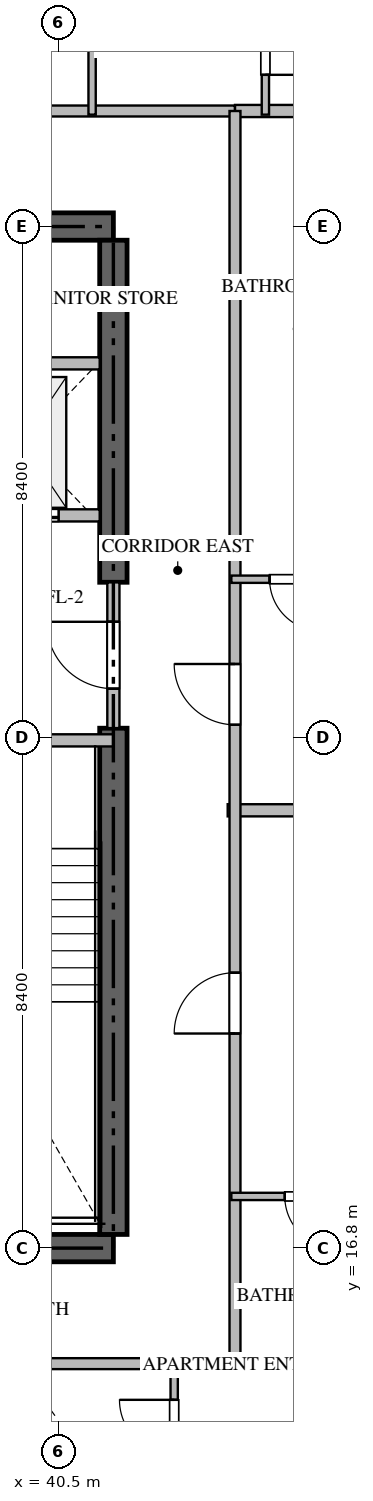
"""IFC4 building model, lengths in metres.
Left out: names, types, materials, properties, quantities, classifications, styles, units other than length and angle.
Written with IfcOpenShell. Run it as: python <this file> out.ifc"""

import sys

from ifc_helpers import new_model, si_unit, direction, frame, frame_2d, origin, place, context, subcontext, project, spatial, rectangle, extrude, source, transform, mapped, element, fill, save


model = new_model("IFC4")
c1 = context("Model", 3, precision=1e-05, world=origin(), true_north=direction((0.0, 1.0)))
c2 = subcontext(c1, "Body", "Model", "MODEL_VIEW")
j1 = project(units=[si_unit("LENGTHUNIT", "METRE"), si_unit("PLANEANGLEUNIT", "RADIAN")], contexts=[c1])
p1 = place(None, origin())
s1 = spatial("IfcSite", under=j1, at=p1, CompositionType="ELEMENT")
p2 = place(p1, origin())
s2 = spatial("IfcBuilding", under=s1, at=p2, CompositionType="ELEMENT")
p3 = place(p2, frame((0.0, 0.0, 60.45)))
s3 = spatial("IfcBuildingStorey", under=s2, at=p3, CompositionType="ELEMENT", Elevation=60.45)
for number, where, z_axis, x_axis in (
    (1, (23.4, 16.8, -0.26), (0.0, 0.0, 1.0), (1.0, 0.0, 0.0)),
    (2, (41.4, 33.6, -0.26), (0.0, 0.0, 1.0), (-1.0, 0.0, 0.0)),
):
    element("IfcWall", number, at=place(p3, frame(where, z_axis=z_axis, x_axis=x_axis)), inside=s3, PredefinedType="SHEAR", context=c2, shape_type="SweptSolid", body=[
        extrude(rectangle(XDim=18.0, YDim=0.45, at=frame_2d((9.0, 0.0))), origin(), (0.0, 0.0, 1.0), 3.748),
    ])
p4 = place(p3, frame((41.4, 17.025, -0.26), z_axis=(0.0, 0.0, 1.0), x_axis=(0.0, 1.0, 0.0)))
e3 = element("IfcWall", 3, at=p4, inside=s3, PredefinedType="SHEAR", context=c2, shape_type="SweptSolid", body=[
    extrude(rectangle(XDim=8.325, YDim=0.45, at=frame_2d((4.163, 0.0))), origin(), (0.0, 0.0, 1.0), 3.748),
])
p5 = place(p3, frame((41.4, 27.75, -0.26), z_axis=(0.0, 0.0, 1.0), x_axis=(0.0, 1.0, 0.0)))
e4 = element("IfcWall", 4, at=p5, inside=s3, PredefinedType="SHEAR", context=c2, shape_type="SweptSolid", body=[
    extrude(rectangle(XDim=5.625, YDim=0.45, at=frame_2d((2.812, 0.0))), origin(), (0.0, 0.0, 1.0), 3.748),
])
p6 = place(p3, frame((36.95, 25.15, 0.0), z_axis=(0.0, 0.0, 1.0), x_axis=(1.0, 0.0, 0.0)))
e5 = element("IfcWall", 5, at=p6, inside=s3, PredefinedType="STANDARD", context=c2, shape_type="SweptSolid", body=[
    extrude(rectangle(XDim=4.45, YDim=0.2, at=frame_2d((2.225, 0.0))), origin(), (0.0, 0.0, 1.0), 3.49),
])
p7 = place(p6, frame((1.65, 0.0, 0.0)))
e6 = element("IfcOpeningElement", 6, at=p7, cuts=e5, PredefinedType="OPENING", context=c2, shape_type="SweptSolid", body=[
    extrude(rectangle(XDim=1.1, YDim=2.15, at=frame_2d((0.55, 1.075))), frame((0.0, 0.11, 0.0), z_axis=(0.0, -1.0, 0.0), x_axis=(1.0, 0.0, 0.0)), (0.0, 0.0, 1.0), 0.22),
])
p8 = place(p3, frame((38.75, 28.85, 0.0), z_axis=(0.0, 0.0, 1.0), x_axis=(1.0, 0.0, 0.0)))
e7 = element("IfcWall", 7, at=p8, inside=s3, PredefinedType="STANDARD", context=c2, shape_type="SweptSolid", body=[
    extrude(rectangle(XDim=2.425, YDim=0.2, at=frame_2d((1.212, 0.0))), origin(), (0.0, 0.0, 1.0), 3.49),
])
p9 = place(p8, frame((0.55, 0.0, 0.0)))
e8 = element("IfcOpeningElement", 8, at=p9, cuts=e7, PredefinedType="OPENING", context=c2, shape_type="SweptSolid", body=[
    extrude(rectangle(XDim=1.2, YDim=2.2, at=frame_2d((0.6, 1.1))), frame((0.0, 0.11, 0.0), z_axis=(0.0, -1.0, 0.0), x_axis=(1.0, 0.0, 0.0)), (0.0, 0.0, 1.0), 0.22),
])
p10 = place(p3, frame((38.75, 31.35, 0.0), z_axis=(0.0, 0.0, 1.0), x_axis=(1.0, 0.0, 0.0)))
e9 = element("IfcWall", 9, at=p10, inside=s3, PredefinedType="STANDARD", context=c2, shape_type="SweptSolid", body=[
    extrude(rectangle(XDim=2.425, YDim=0.2, at=frame_2d((1.212, 0.0))), origin(), (0.0, 0.0, 1.0), 3.49),
])
p11 = place(p3, frame((41.4, 25.352, 0.0), z_axis=(0.0, 0.0, 1.0), x_axis=(0.0, 1.0, 0.0)))
e10 = element("IfcWall", 10, at=p11, inside=s3, PredefinedType="STANDARD", context=c2, shape_type="SweptSolid", body=[
    extrude(rectangle(XDim=2.396, YDim=0.2, at=frame_2d((1.198, 0.0))), origin(), (0.0, 0.0, 1.0), 3.49),
])
p12 = place(p11, frame((0.648, 0.0, 0.0)))
e11 = element("IfcOpeningElement", 11, at=p12, cuts=e10, PredefinedType="OPENING", context=c2, shape_type="SweptSolid", body=[
    extrude(rectangle(XDim=1.1, YDim=2.15, at=frame_2d((0.55, 1.075))), frame((0.0, 0.11, 0.0), z_axis=(0.0, -1.0, 0.0), x_axis=(1.0, 0.0, 0.0)), (0.0, 0.0, 1.0), 0.22),
])
p13 = place(p3, frame((43.28, 24.0, 0.0), z_axis=(0.0, 0.0, 1.0), x_axis=(1.0, 0.0, 0.0)))
e12 = element("IfcWall", 12, at=p13, inside=s3, PredefinedType="PARTITIONING", context=c2, shape_type="SweptSolid", body=[
    extrude(rectangle(XDim=15.438, YDim=0.2, at=frame_2d((7.719, 0.0))), origin(), (0.0, 0.0, 1.0), 3.49),
])
for number, where, z_axis, x_axis in (
    (13, (43.4, 14.9, 0.0), (0.0, 0.0, 1.0), (1.0, 0.0, 0.0)),
    (14, (43.4, 35.5, 0.0), (0.0, 0.0, 1.0), (1.0, 0.0, 0.0)),
):
    element("IfcWall", number, at=place(p3, frame(where, z_axis=z_axis, x_axis=x_axis)), inside=s3, PredefinedType="PARTITIONING", context=c2, shape_type="SweptSolid", body=[
        extrude(rectangle(XDim=15.318, YDim=0.2, at=frame_2d((7.659, 0.0))), origin(), (0.0, 0.0, 1.0), 3.49),
    ])
p14 = place(p3, frame((21.402, 14.9, 0.0), z_axis=(0.0, 0.0, 1.0), x_axis=(1.0, 0.0, 0.0)))
e15 = element("IfcWall", 15, at=p14, inside=s3, PredefinedType="PARTITIONING", context=c2, shape_type="SweptSolid", body=[
    extrude(rectangle(XDim=21.996, YDim=0.18, at=frame_2d((10.998, 0.0))), origin(), (0.0, 0.0, 1.0), 3.49),
])
p15 = place(p14, frame((9.742, 0.0, 0.0)))
e16 = element("IfcOpeningElement", 16, at=p15, cuts=e15, PredefinedType="OPENING", context=c2, shape_type="SweptSolid", body=[
    extrude(rectangle(XDim=1.0, YDim=2.15, at=frame_2d((0.5, 1.075))), frame((0.0, 0.1, 0.0), z_axis=(0.0, -1.0, 0.0), x_axis=(1.0, 0.0, 0.0)), (0.0, 0.0, 1.0), 0.2),
])
p16 = place(p14, frame((14.781, 0.0, 0.0)))
e17 = element("IfcOpeningElement", 17, at=p16, cuts=e15, PredefinedType="OPENING", context=c2, shape_type="SweptSolid", body=[
    extrude(rectangle(XDim=1.0, YDim=2.15, at=frame_2d((0.5, 1.075))), frame((0.0, 0.1, 0.0), z_axis=(0.0, -1.0, 0.0), x_axis=(1.0, 0.0, 0.0)), (0.0, 0.0, 1.0), 0.2),
])
p17 = place(p3, frame((21.402, 35.5, 0.0), z_axis=(0.0, 0.0, 1.0), x_axis=(1.0, 0.0, 0.0)))
e18 = element("IfcWall", 18, at=p17, inside=s3, PredefinedType="PARTITIONING", context=c2, shape_type="SweptSolid", body=[
    extrude(rectangle(XDim=21.996, YDim=0.18, at=frame_2d((10.998, 0.0))), origin(), (0.0, 0.0, 1.0), 3.49),
])
p18 = place(p17, frame((2.1, 0.0, 0.0)))
e19 = element("IfcOpeningElement", 19, at=p18, cuts=e18, PredefinedType="OPENING", context=c2, shape_type="SweptSolid", body=[
    extrude(rectangle(XDim=1.0, YDim=2.15, at=frame_2d((0.5, 1.075))), frame((0.0, 0.1, 0.0), z_axis=(0.0, -1.0, 0.0), x_axis=(1.0, 0.0, 0.0)), (0.0, 0.0, 1.0), 0.2),
])
p19 = place(p17, frame((5.942, 0.0, 0.0)))
e20 = element("IfcOpeningElement", 20, at=p19, cuts=e18, PredefinedType="OPENING", context=c2, shape_type="SweptSolid", body=[
    extrude(rectangle(XDim=1.0, YDim=2.15, at=frame_2d((0.5, 1.075))), frame((0.0, 0.1, 0.0), z_axis=(0.0, -1.0, 0.0), x_axis=(1.0, 0.0, 0.0)), (0.0, 0.0, 1.0), 0.2),
])
p20 = place(p17, frame((16.272, 0.0, 0.0)))
e21 = element("IfcOpeningElement", 21, at=p20, cuts=e18, PredefinedType="OPENING", context=c2, shape_type="SweptSolid", body=[
    extrude(rectangle(XDim=1.0, YDim=2.15, at=frame_2d((0.5, 1.075))), frame((0.0, 0.1, 0.0), z_axis=(0.0, -1.0, 0.0), x_axis=(1.0, 0.0, 0.0)), (0.0, 0.0, 1.0), 0.2),
])
p21 = place(p3, frame((43.4, 14.9, 0.0), z_axis=(0.0, 0.0, 1.0), x_axis=(0.0, 1.0, 0.0)))
e22 = element("IfcWall", 22, at=p21, inside=s3, PredefinedType="PARTITIONING", context=c2, shape_type="SweptSolid", body=[
    extrude(rectangle(XDim=20.6, YDim=0.18, at=frame_2d((10.3, 0.0))), origin(), (0.0, 0.0, 1.0), 3.49),
])
p22 = place(p21, frame((5.429, 0.0, 0.0)))
e23 = element("IfcOpeningElement", 23, at=p22, cuts=e22, PredefinedType="OPENING", context=c2, shape_type="SweptSolid", body=[
    extrude(rectangle(XDim=1.0, YDim=2.15, at=frame_2d((0.5, 1.075))), frame((0.0, 0.1, 0.0), z_axis=(0.0, -1.0, 0.0), x_axis=(1.0, 0.0, 0.0)), (0.0, 0.0, 1.0), 0.2),
])
p23 = place(p21, frame((10.506, 0.0, 0.0)))
e24 = element("IfcOpeningElement", 24, at=p23, cuts=e22, PredefinedType="OPENING", context=c2, shape_type="SweptSolid", body=[
    extrude(rectangle(XDim=1.0, YDim=2.15, at=frame_2d((0.5, 1.075))), frame((0.0, 0.1, 0.0), z_axis=(0.0, -1.0, 0.0), x_axis=(1.0, 0.0, 0.0)), (0.0, 0.0, 1.0), 0.2),
])
p24 = place(p3, frame((42.4, 12.75, 0.0), z_axis=(0.0, 0.0, 1.0), x_axis=(0.0, 1.0, 0.0)))
e25 = element("IfcWall", 25, at=p24, inside=s3, PredefinedType="PARTITIONING", context=c2, shape_type="SweptSolid", body=[
    extrude(rectangle(XDim=2.21, YDim=0.12, at=frame_2d((1.105, 0.0))), origin(), (0.0, 0.0, 1.0), 3.49),
])
p25 = place(p24, frame((0.655, 0.0, 0.0)))
e26 = element("IfcOpeningElement", 26, at=p25, cuts=e25, PredefinedType="OPENING", context=c2, shape_type="SweptSolid", body=[
    extrude(rectangle(XDim=0.9, YDim=2.1, at=frame_2d((0.45, 1.05))), frame((0.0, 0.07, 0.0), z_axis=(0.0, -1.0, 0.0), x_axis=(1.0, 0.0, 0.0)), (0.0, 0.0, 1.0), 0.14),
])
p26 = place(p3, frame((41.05, 38.25, 0.0), z_axis=(0.0, 0.0, 1.0), x_axis=(0.0, -1.0, 0.0)))
e27 = element("IfcWall", 27, at=p26, inside=s3, PredefinedType="PARTITIONING", context=c2, shape_type="SweptSolid", body=[
    extrude(rectangle(XDim=2.81, YDim=0.12, at=frame_2d((1.405, 0.0))), origin(), (0.0, 0.0, 1.0), 3.49),
])
p27 = place(p3, frame((43.9, 37.65, 0.0), z_axis=(0.0, 0.0, 1.0), x_axis=(0.0, -1.0, 0.0)))
e28 = element("IfcWall", 28, at=p27, inside=s3, PredefinedType="PARTITIONING", context=c2, shape_type="SweptSolid", body=[
    extrude(rectangle(XDim=2.21, YDim=0.12, at=frame_2d((1.105, 0.0))), origin(), (0.0, 0.0, 1.0), 3.49),
])
p28 = place(p27, frame((0.655, 0.0, 0.0)))
e29 = element("IfcOpeningElement", 29, at=p28, cuts=e28, PredefinedType="OPENING", context=c2, shape_type="SweptSolid", body=[
    extrude(rectangle(XDim=0.9, YDim=2.1, at=frame_2d((0.45, 1.05))), frame((0.0, 0.07, 0.0), z_axis=(0.0, -1.0, 0.0), x_axis=(1.0, 0.0, 0.0)), (0.0, 0.0, 1.0), 0.14),
])
p29 = place(p3, frame((45.948, 17.65, 0.0), z_axis=(0.0, 0.0, 1.0), x_axis=(-1.0, 0.0, 0.0)))
e30 = element("IfcWall", 30, at=p29, inside=s3, PredefinedType="PARTITIONING", context=c2, shape_type="SweptSolid", body=[
    extrude(rectangle(XDim=2.608, YDim=0.12, at=frame_2d((1.304, 0.0))), origin(), (0.0, 0.0, 1.0), 3.49),
])
p30 = place(p29, frame((0.879, 0.0, 0.0)))
e31 = element("IfcOpeningElement", 31, at=p30, cuts=e30, PredefinedType="OPENING", context=c2, shape_type="SweptSolid", body=[
    extrude(rectangle(XDim=0.85, YDim=2.1, at=frame_2d((0.425, 1.05))), frame((0.0, 0.07, 0.0), z_axis=(0.0, -1.0, 0.0), x_axis=(1.0, 0.0, 0.0)), (0.0, 0.0, 1.0), 0.14),
])
p31 = place(p3, frame((45.448, 27.8, 0.0), z_axis=(0.0, 0.0, 1.0), x_axis=(-1.0, 0.0, 0.0)))
e32 = element("IfcWall", 32, at=p31, inside=s3, PredefinedType="PARTITIONING", context=c2, shape_type="SweptSolid", body=[
    extrude(rectangle(XDim=2.108, YDim=0.12, at=frame_2d((1.054, 0.0))), origin(), (0.0, 0.0, 1.0), 3.49),
])
p32 = place(p31, frame((0.629, 0.0, 0.0)))
e33 = element("IfcOpeningElement", 33, at=p32, cuts=e32, PredefinedType="OPENING", context=c2, shape_type="SweptSolid", body=[
    extrude(rectangle(XDim=0.85, YDim=2.1, at=frame_2d((0.425, 1.05))), frame((0.0, 0.07, 0.0), z_axis=(0.0, -1.0, 0.0), x_axis=(1.0, 0.0, 0.0)), (0.0, 0.0, 1.0), 0.14),
])
m1 = source(origin(), c2, "Body", "SweptSolid", [
    extrude(rectangle(XDim=1.2, YDim=2.2, at=frame_2d((0.6, 1.1))), frame((0.0, 0.025, 0.0), z_axis=(0.0, -1.0, 0.0), x_axis=(1.0, 0.0, 0.0)), (0.0, 0.0, 1.0), 0.05),
])
p33 = place(p9, origin())
e34 = element("IfcDoor", 34, at=p33, inside=s3, OperationType="DOUBLE_DOOR_SLIDING", PredefinedType="DOOR", context=c2, shape_type="MappedRepresentation", body=[
    mapped(m1, transform((0.0, 0.0, 0.0), scale=1.0)),
])
fill(e8, e34)
m2 = source(origin(), c2, "Body", "SweptSolid", [
    extrude(rectangle(XDim=1.1, YDim=2.15, at=frame_2d((0.55, 1.075))), frame((0.0, 0.025, 0.0), z_axis=(0.0, -1.0, 0.0), x_axis=(1.0, 0.0, 0.0)), (0.0, 0.0, 1.0), 0.05),
])
p34 = place(p12, origin())
e35 = element("IfcDoor", 35, at=p34, inside=s3, OperationType="SINGLE_SWING_RIGHT", PredefinedType="DOOR", context=c2, shape_type="MappedRepresentation", body=[
    mapped(m2, transform((0.0, 0.0, 0.0), scale=1.0)),
])
fill(e11, e35)
m3 = source(origin(), c2, "Body", "SweptSolid", [
    extrude(rectangle(XDim=1.0, YDim=2.15, at=frame_2d((0.5, 1.075))), frame((0.0, 0.025, 0.0), z_axis=(0.0, -1.0, 0.0), x_axis=(1.0, 0.0, 0.0)), (0.0, 0.0, 1.0), 0.05),
])
p35 = place(p22, origin())
e36 = element("IfcDoor", 36, at=p35, inside=s3, OperationType="SINGLE_SWING_LEFT", PredefinedType="DOOR", context=c2, shape_type="MappedRepresentation", body=[
    mapped(m3, transform((0.0, 0.0, 0.0), scale=1.0)),
])
fill(e23, e36)
p36 = place(p23, origin())
e37 = element("IfcDoor", 37, at=p36, inside=s3, OperationType="SINGLE_SWING_RIGHT", PredefinedType="DOOR", context=c2, shape_type="MappedRepresentation", body=[
    mapped(m3, transform((0.0, 0.0, 0.0), scale=1.0)),
])
fill(e24, e37)
m4 = source(origin(), c2, "Body", "SweptSolid", [
    extrude(rectangle(XDim=0.9, YDim=2.1, at=frame_2d((0.45, 1.05))), frame((0.0, 0.025, 0.0), z_axis=(0.0, -1.0, 0.0), x_axis=(1.0, 0.0, 0.0)), (0.0, 0.0, 1.0), 0.05),
])
p37 = place(p25, origin())
e38 = element("IfcDoor", 38, at=p37, inside=s3, OperationType="SINGLE_SWING_RIGHT", PredefinedType="DOOR", context=c2, shape_type="MappedRepresentation", body=[
    mapped(m4, transform((0.0, 0.0, 0.0), scale=1.0)),
])
fill(e26, e38)
p38 = place(p28, origin())
e39 = element("IfcDoor", 39, at=p38, inside=s3, OperationType="SINGLE_SWING_RIGHT", PredefinedType="DOOR", context=c2, shape_type="MappedRepresentation", body=[
    mapped(m4, transform((0.0, 0.0, 0.0), scale=1.0)),
])
fill(e29, e39)
m5 = source(origin(), c2, "Body", "SweptSolid", [
    extrude(rectangle(XDim=0.85, YDim=2.1, at=frame_2d((0.425, 1.05))), frame((0.0, 0.025, 0.0), z_axis=(0.0, -1.0, 0.0), x_axis=(1.0, 0.0, 0.0)), (0.0, 0.0, 1.0), 0.05),
])
p39 = place(p30, origin())
e40 = element("IfcDoor", 40, at=p39, inside=s3, OperationType="SINGLE_SWING_LEFT", PredefinedType="DOOR", context=c2, shape_type="MappedRepresentation", body=[
    mapped(m5, transform((0.0, 0.0, 0.0), scale=1.0)),
])
fill(e31, e40)
p40 = place(p32, origin())
e41 = element("IfcDoor", 41, at=p40, inside=s3, OperationType="SINGLE_SWING_LEFT", PredefinedType="DOOR", context=c2, shape_type="MappedRepresentation", body=[
    mapped(m5, transform((0.0, 0.0, 0.0), scale=1.0)),
])
fill(e33, e41)
save(model, sys.argv[1])
